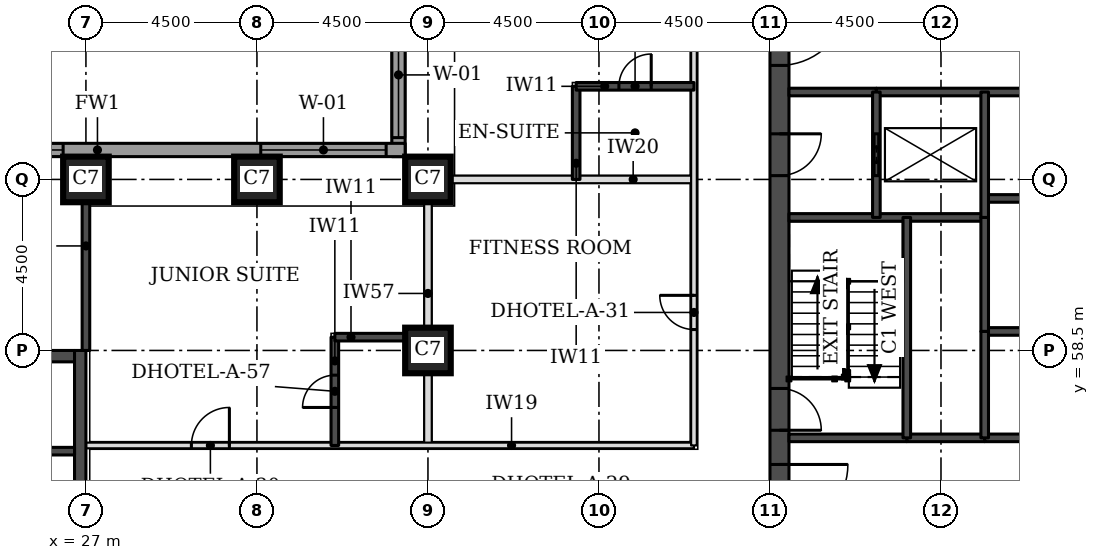
"""IFC4 building model, lengths in metres.
Left out: names, types, materials, properties, quantities, classifications, styles, units other than length and angle.
Written with IfcOpenShell. Run it as: python <this file> out.ifc"""

import sys

from ifc_helpers import new_model, si_unit, direction, frame, frame_2d, origin, origin_2d, place, context, subcontext, project, spatial, rectangle, extrude, element, fill, save


model = new_model("IFC4")
c1 = context("Model", 3, precision=1e-05, world=origin(), true_north=direction((0.0, 1.0)))
c2 = subcontext(c1, "Body", "Model", "MODEL_VIEW")
j1 = project(units=[si_unit("LENGTHUNIT", "METRE"), si_unit("PLANEANGLEUNIT", "RADIAN")], contexts=[c1])
p1 = place(None, origin())
s1 = spatial("IfcSite", under=j1, at=p1, CompositionType="ELEMENT")
p2 = place(p1, origin())
s2 = spatial("IfcBuilding", under=s1, at=p2, CompositionType="ELEMENT")
p3 = place(p2, frame((0.0, 0.0, 49.5)))
s3 = spatial("IfcBuildingStorey", under=s2, at=p3, CompositionType="ELEMENT", Elevation=49.5)
for number, where, z_axis, x_axis in (
    (1, (36.0, 58.5, 0.0), (0.0, 0.0, 1.0), (1.0, 0.0, 0.0)),
    (2, (27.0, 63.0, 0.0), (0.0, 0.0, 1.0), (1.0, 0.0, 0.0)),
    (3, (31.5, 63.0, 0.0), (0.0, 0.0, 1.0), (1.0, 0.0, 0.0)),
    (4, (36.0, 63.0, 0.0), (0.0, 0.0, 1.0), (1.0, 0.0, 0.0)),
):
    element("IfcColumn", number, at=place(p3, frame(where, z_axis=z_axis, x_axis=x_axis)), inside=s3, PredefinedType="COLUMN", context=c2, shape_type="SweptSolid", body=[
        extrude(rectangle(XDim=1.2, YDim=1.2, at=origin_2d()), origin(), (0.0, 0.0, 1.0), 3.3),
    ])
p4 = place(p3, frame((45.25, 49.5, 0.0), z_axis=(0.0, 0.0, 1.0), x_axis=(0.0, 1.0, 0.0)))
e5 = element("IfcWall", 5, at=p4, inside=s3, PredefinedType="SHEAR", context=c2, shape_type="SweptSolid", body=[
    extrude(rectangle(XDim=22.5, YDim=0.5, at=frame_2d((11.25, 0.0))), origin(), (0.0, 0.0, 1.0), 3.3),
])
p5 = place(p4, frame((4.2, 0.0, 0.0)))
e6 = element("IfcOpeningElement", 6, at=p5, cuts=e5, PredefinedType="OPENING", context=c2, shape_type="SweptSolid", body=[
    extrude(rectangle(XDim=1.8, YDim=2.1, at=frame_2d((0.9, 1.05))), frame((0.0, 0.26, 0.0), z_axis=(0.0, -1.0, 0.0), x_axis=(1.0, 0.0, 0.0)), (0.0, 0.0, 1.0), 0.52),
])
p6 = place(p4, frame((6.9, 0.0, 0.0)))
e7 = element("IfcOpeningElement", 7, at=p6, cuts=e5, PredefinedType="OPENING", context=c2, shape_type="SweptSolid", body=[
    extrude(rectangle(XDim=1.1, YDim=2.1, at=frame_2d((0.55, 1.05))), frame((0.0, 0.26, 0.0), z_axis=(0.0, -1.0, 0.0), x_axis=(1.0, 0.0, 0.0)), (0.0, 0.0, 1.0), 0.52),
])
p7 = place(p4, frame((13.6, 0.0, 0.0)))
e8 = element("IfcOpeningElement", 8, at=p7, cuts=e5, PredefinedType="OPENING", context=c2, shape_type="SweptSolid", body=[
    extrude(rectangle(XDim=1.1, YDim=2.1, at=frame_2d((0.55, 1.05))), frame((0.0, 0.26, 0.0), z_axis=(0.0, -1.0, 0.0), x_axis=(1.0, 0.0, 0.0)), (0.0, 0.0, 1.0), 0.52),
])
p8 = place(p4, frame((16.5, 0.0, 0.0)))
e9 = element("IfcOpeningElement", 9, at=p8, cuts=e5, PredefinedType="OPENING", context=c2, shape_type="SweptSolid", body=[
    extrude(rectangle(XDim=1.8, YDim=2.1, at=frame_2d((0.9, 1.05))), frame((0.0, 0.26, 0.0), z_axis=(0.0, -1.0, 0.0), x_axis=(1.0, 0.0, 0.0)), (0.0, 0.0, 1.0), 0.52),
])
p9 = place(p3, frame((18.3, 58.35, 0.0), z_axis=(0.0, 0.0, 1.0), x_axis=(1.0, 0.0, 0.0)))
e10 = element("IfcWall", 10, at=p9, inside=s3, PredefinedType="SHEAR", context=c2, shape_type="SweptSolid", body=[
    extrude(rectangle(XDim=8.4, YDim=0.3, at=frame_2d((4.2, 0.0))), origin(), (0.0, 0.0, 1.0), 3.3),
])
p10 = place(p9, frame((3.3, 0.0, 0.0)))
e11 = element("IfcOpeningElement", 11, at=p10, cuts=e10, PredefinedType="OPENING", context=c2, shape_type="SweptSolid", body=[
    extrude(rectangle(XDim=1.8, YDim=2.1, at=frame_2d((0.9, 1.05))), frame((0.0, 0.16, 0.0), z_axis=(0.0, -1.0, 0.0), x_axis=(1.0, 0.0, 0.0)), (0.0, 0.0, 1.0), 0.32),
])
p11 = place(p3, frame((26.85, 49.5, 0.0), z_axis=(0.0, 0.0, 1.0), x_axis=(0.0, 1.0, 0.0)))
e12 = element("IfcWall", 12, at=p11, inside=s3, PredefinedType="SHEAR", context=c2, shape_type="SweptSolid", body=[
    extrude(rectangle(XDim=9.0, YDim=0.3, at=frame_2d((4.5, 0.0))), origin(), (0.0, 0.0, 1.0), 3.3),
])
p12 = place(p3, frame((35.225, 76.894, 0.0), z_axis=(0.0, 0.0, 1.0), x_axis=(0.0, -1.0, 0.0)))
e13 = element("IfcWall", 13, at=p12, inside=s3, PredefinedType="STANDARD", context=c2, shape_type="SweptSolid", body=[
    extrude(rectangle(XDim=13.293, YDim=0.35, at=frame_2d((6.647, 0.0))), origin(), (0.0, 0.0, 1.0), 3.055),
])
p13 = place(p12, frame((9.493, 0.0, 0.8)))
e14 = element("IfcOpeningElement", 14, at=p13, cuts=e13, PredefinedType="OPENING", context=c2, shape_type="SweptSolid", body=[
    extrude(rectangle(XDim=3.3, YDim=1.5, at=frame_2d((1.65, 0.75))), frame((0.0, 0.185, 0.0), z_axis=(0.0, -1.0, 0.0), x_axis=(1.0, 0.0, 0.0)), (0.0, 0.0, 1.0), 0.37),
])
p14 = place(p3, frame((35.4, 63.775, 0.0), z_axis=(0.0, 0.0, 1.0), x_axis=(-1.0, 0.0, 0.0)))
e15 = element("IfcWall", 15, at=p14, inside=s3, PredefinedType="STANDARD", context=c2, shape_type="SweptSolid", body=[
    extrude(rectangle(XDim=17.793, YDim=0.35, at=frame_2d((8.897, 0.0))), origin(), (0.0, 0.0, 1.0), 3.055),
])
p15 = place(p14, frame((0.5, 0.0, 0.8)))
e16 = element("IfcOpeningElement", 16, at=p15, cuts=e15, PredefinedType="OPENING", context=c2, shape_type="SweptSolid", body=[
    extrude(rectangle(XDim=3.3, YDim=1.5, at=frame_2d((1.65, 0.75))), frame((0.0, 0.185, 0.0), z_axis=(0.0, -1.0, 0.0), x_axis=(1.0, 0.0, 0.0)), (0.0, 0.0, 1.0), 0.37),
])
p16 = place(p14, frame((9.0, 0.0, 0.8)))
e17 = element("IfcOpeningElement", 17, at=p16, cuts=e15, PredefinedType="OPENING", context=c2, shape_type="SweptSolid", body=[
    extrude(rectangle(XDim=3.3, YDim=1.5, at=frame_2d((1.65, 0.75))), frame((0.0, 0.185, 0.0), z_axis=(0.0, -1.0, 0.0), x_axis=(1.0, 0.0, 0.0)), (0.0, 0.0, 1.0), 0.37),
])
p17 = place(p3, frame((36.0, 56.0, 0.0), z_axis=(0.0, 0.0, 1.0), x_axis=(0.0, 1.0, 0.0)))
e18 = element("IfcWall", 18, at=p17, inside=s3, PredefinedType="PARTITIONING", context=c2, shape_type="SweptSolid", body=[
    extrude(rectangle(XDim=6.4, YDim=0.2, at=frame_2d((3.2, 0.0))), origin(), (0.0, 0.0, 1.0), 2.33),
])
p18 = place(p3, frame((36.6, 63.0, 0.0), z_axis=(0.0, 0.0, 1.0), x_axis=(1.0, 0.0, 0.0)))
e19 = element("IfcWall", 19, at=p18, inside=s3, PredefinedType="PARTITIONING", context=c2, shape_type="SweptSolid", body=[
    extrude(rectangle(XDim=6.4, YDim=0.2, at=frame_2d((3.2, 0.0))), origin(), (0.0, 0.0, 1.0), 3.08),
])
p19 = place(p3, frame((27.0, 56.0, 0.0), z_axis=(0.0, 0.0, 1.0), x_axis=(1.0, 0.0, 0.0)))
e20 = element("IfcWall", 20, at=p19, inside=s3, PredefinedType="PARTITIONING", context=c2, shape_type="SweptSolid", body=[
    extrude(rectangle(XDim=16.0, YDim=0.15, at=frame_2d((8.0, 0.0))), origin(), (0.0, 0.0, 1.0), 3.08),
])
p20 = place(p19, frame((2.775, 0.0, 0.0)))
e21 = element("IfcOpeningElement", 21, at=p20, cuts=e20, PredefinedType="OPENING", context=c2, shape_type="SweptSolid", body=[
    extrude(rectangle(XDim=1.0, YDim=2.1, at=frame_2d((0.5, 1.05))), frame((0.0, 0.085, 0.0), z_axis=(0.0, -1.0, 0.0), x_axis=(1.0, 0.0, 0.0)), (0.0, 0.0, 1.0), 0.17),
])
p21 = place(p3, frame((43.0, 56.0, 0.0), z_axis=(0.0, 0.0, 1.0), x_axis=(0.0, 1.0, 0.0)))
e22 = element("IfcWall", 22, at=p21, inside=s3, PredefinedType="PARTITIONING", context=c2, shape_type="SweptSolid", body=[
    extrude(rectangle(XDim=18.0, YDim=0.15, at=frame_2d((9.0, 0.0))), origin(), (0.0, 0.0, 1.0), 3.08),
])
p22 = place(p21, frame((12.225, 0.0, 0.0)))
e23 = element("IfcOpeningElement", 23, at=p22, cuts=e22, PredefinedType="OPENING", context=c2, shape_type="SweptSolid", body=[
    extrude(rectangle(XDim=1.0, YDim=2.1, at=frame_2d((0.5, 1.05))), frame((0.0, 0.085, 0.0), z_axis=(0.0, -1.0, 0.0), x_axis=(1.0, 0.0, 0.0)), (0.0, 0.0, 1.0), 0.17),
])
p23 = place(p21, frame((16.553, 0.0, 0.0)))
e24 = element("IfcOpeningElement", 24, at=p23, cuts=e22, PredefinedType="OPENING", context=c2, shape_type="SweptSolid", body=[
    extrude(rectangle(XDim=1.0, YDim=2.1, at=frame_2d((0.5, 1.05))), frame((0.0, 0.085, 0.0), z_axis=(0.0, -1.0, 0.0), x_axis=(1.0, 0.0, 0.0)), (0.0, 0.0, 1.0), 0.17),
])
p24 = place(p21, frame((3.05, 0.0, 0.0)))
e25 = element("IfcOpeningElement", 25, at=p24, cuts=e22, PredefinedType="OPENING", context=c2, shape_type="SweptSolid", body=[
    extrude(rectangle(XDim=0.9, YDim=2.1, at=frame_2d((0.45, 1.05))), frame((0.0, 0.085, 0.0), z_axis=(0.0, -1.0, 0.0), x_axis=(1.0, 0.0, 0.0)), (0.0, 0.0, 1.0), 0.17),
])
p25 = place(p3, frame((27.0, 58.5, 0.0), z_axis=(0.0, 0.0, 1.0), x_axis=(0.0, 1.0, 0.0)))
e26 = element("IfcWall", 26, at=p25, inside=s3, PredefinedType="SOLIDWALL", context=c2, shape_type="SweptSolid", body=[
    extrude(rectangle(XDim=3.9, YDim=0.2, at=frame_2d((1.95, 0.0))), origin(), (0.0, 0.0, 1.0), 3.08),
])
p26 = place(p3, frame((33.55, 56.0, 0.0), z_axis=(0.0, 0.0, 1.0), x_axis=(0.0, 1.0, 0.0)))
e27 = element("IfcWall", 27, at=p26, inside=s3, PredefinedType="SOLIDWALL", context=c2, shape_type="SweptSolid", body=[
    extrude(rectangle(XDim=2.85, YDim=0.2, at=frame_2d((1.425, 0.0))), origin(), (0.0, 0.0, 1.0), 3.08),
])
p27 = place(p26, frame((1.0, 0.0, 0.0)))
e28 = element("IfcOpeningElement", 28, at=p27, cuts=e27, PredefinedType="OPENING", context=c2, shape_type="SweptSolid", body=[
    extrude(rectangle(XDim=0.85, YDim=2.1, at=frame_2d((0.425, 1.05))), frame((0.0, 0.11, 0.0), z_axis=(0.0, -1.0, 0.0), x_axis=(1.0, 0.0, 0.0)), (0.0, 0.0, 1.0), 0.22),
])
for number, where, z_axis, x_axis in (
    (29, (33.55, 58.85, 0.0), (0.0, 0.0, 1.0), (1.0, 0.0, 0.0)),
    (30, (39.9, 63.0, 0.0), (0.0, 0.0, 1.0), (0.0, 1.0, 0.0)),
):
    element("IfcWall", number, at=place(p3, frame(where, z_axis=z_axis, x_axis=x_axis)), inside=s3, PredefinedType="SOLIDWALL", context=c2, shape_type="SweptSolid", body=[
        extrude(rectangle(XDim=2.45, YDim=0.2, at=frame_2d((1.225, 0.0))), origin(), (0.0, 0.0, 1.0), 3.08),
    ])
p28 = place(p3, frame((39.9, 65.45, 0.0), z_axis=(0.0, 0.0, 1.0), x_axis=(1.0, 0.0, 0.0)))
e31 = element("IfcWall", 31, at=p28, inside=s3, PredefinedType="SOLIDWALL", context=c2, shape_type="SweptSolid", body=[
    extrude(rectangle(XDim=3.1, YDim=0.2, at=frame_2d((1.55, 0.0))), origin(), (0.0, 0.0, 1.0), 3.08),
])
p29 = place(p28, frame((1.125, 0.0, 0.0)))
e32 = element("IfcOpeningElement", 32, at=p29, cuts=e31, PredefinedType="OPENING", context=c2, shape_type="SweptSolid", body=[
    extrude(rectangle(XDim=0.85, YDim=2.1, at=frame_2d((0.425, 1.05))), frame((0.0, 0.11, 0.0), z_axis=(0.0, -1.0, 0.0), x_axis=(1.0, 0.0, 0.0)), (0.0, 0.0, 1.0), 0.22),
])
p30 = place(p3, frame((48.6, 56.2, 0.0), z_axis=(0.0, 0.0, 1.0), x_axis=(1.0, 0.0, 0.0)))
e33 = element("IfcWall", 33, at=p30, inside=s3, PredefinedType="SOLIDWALL", context=c2, shape_type="SweptSolid", body=[
    extrude(rectangle(XDim=2.05, YDim=0.2, at=frame_2d((1.025, 0.0))), origin(), (0.0, 0.0, 1.0), 3.08),
])
p31 = place(p3, frame((45.5, 56.2, 0.0), z_axis=(0.0, 0.0, 1.0), x_axis=(1.0, 0.0, 0.0)))
e34 = element("IfcWall", 34, at=p31, inside=s3, PredefinedType="SOLIDWALL", context=c2, shape_type="SweptSolid", body=[
    extrude(rectangle(XDim=3.1, YDim=0.2, at=frame_2d((1.55, 0.0))), origin(), (0.0, 0.0, 1.0), 3.08),
])
p32 = place(p3, frame((50.65, 56.2, 0.0), z_axis=(0.0, 0.0, 1.0), x_axis=(1.0, 0.0, 0.0)))
e35 = element("IfcWall", 35, at=p32, inside=s3, PredefinedType="SOLIDWALL", context=c2, shape_type="SweptSolid", body=[
    extrude(rectangle(XDim=11.2, YDim=0.2, at=frame_2d((5.6, 0.0))), origin(), (0.0, 0.0, 1.0), 3.08),
])
p33 = place(p3, frame((50.65, 59.0, 0.0), z_axis=(0.0, 0.0, 1.0), x_axis=(1.0, 0.0, 0.0)))
e36 = element("IfcWall", 36, at=p33, inside=s3, PredefinedType="SOLIDWALL", context=c2, shape_type="SweptSolid", body=[
    extrude(rectangle(XDim=11.2, YDim=0.2, at=frame_2d((5.6, 0.0))), origin(), (0.0, 0.0, 1.0), 3.3),
])
p34 = place(p3, frame((45.5, 62.0, 0.0), z_axis=(0.0, 0.0, 1.0), x_axis=(1.0, 0.0, 0.0)))
e37 = element("IfcWall", 37, at=p34, inside=s3, PredefinedType="SOLIDWALL", context=c2, shape_type="SweptSolid", body=[
    extrude(rectangle(XDim=5.15, YDim=0.2, at=frame_2d((2.575, 0.0))), origin(), (0.0, 0.0, 1.0), 3.08),
])
p35 = place(p3, frame((50.65, 62.5, 0.0), z_axis=(0.0, 0.0, 1.0), x_axis=(1.0, 0.0, 0.0)))
e38 = element("IfcWall", 38, at=p35, inside=s3, PredefinedType="SOLIDWALL", context=c2, shape_type="SweptSolid", body=[
    extrude(rectangle(XDim=11.2, YDim=0.2, at=frame_2d((5.6, 0.0))), origin(), (0.0, 0.0, 1.0), 3.3),
])
p36 = place(p3, frame((45.5, 65.3, 0.0), z_axis=(0.0, 0.0, 1.0), x_axis=(1.0, 0.0, 0.0)))
e39 = element("IfcWall", 39, at=p36, inside=s3, PredefinedType="SOLIDWALL", context=c2, shape_type="SweptSolid", body=[
    extrude(rectangle(XDim=2.3, YDim=0.2, at=frame_2d((1.15, 0.0))), origin(), (0.0, 0.0, 1.0), 3.08),
])
p37 = place(p3, frame((47.8, 65.3, 0.0), z_axis=(0.0, 0.0, 1.0), x_axis=(1.0, 0.0, 0.0)))
e40 = element("IfcWall", 40, at=p37, inside=s3, PredefinedType="SOLIDWALL", context=c2, shape_type="SweptSolid", body=[
    extrude(rectangle(XDim=16.9, YDim=0.2, at=frame_2d((8.45, 0.0))), origin(), (0.0, 0.0, 1.0), 3.08),
])
p38 = place(p3, frame((47.8, 62.0, 0.0), z_axis=(0.0, 0.0, 1.0), x_axis=(0.0, 1.0, 0.0)))
e41 = element("IfcWall", 41, at=p38, inside=s3, PredefinedType="SOLIDWALL", context=c2, shape_type="SweptSolid", body=[
    extrude(rectangle(XDim=3.3, YDim=0.2, at=frame_2d((1.65, 0.0))), origin(), (0.0, 0.0, 1.0), 3.08),
])
p39 = place(p38, frame((1.1, 0.0, 0.0)))
e42 = element("IfcOpeningElement", 42, at=p39, cuts=e41, PredefinedType="OPENING", context=c2, shape_type="SweptSolid", body=[
    extrude(rectangle(XDim=1.1, YDim=2.1, at=frame_2d((0.55, 1.05))), frame((0.0, 0.11, 0.0), z_axis=(0.0, -1.0, 0.0), x_axis=(1.0, 0.0, 0.0)), (0.0, 0.0, 1.0), 0.22),
])
p40 = place(p3, frame((48.6, 56.2, 0.0), z_axis=(0.0, 0.0, 1.0), x_axis=(0.0, 1.0, 0.0)))
e43 = element("IfcWall", 43, at=p40, inside=s3, PredefinedType="SOLIDWALL", context=c2, shape_type="SweptSolid", body=[
    extrude(rectangle(XDim=5.8, YDim=0.2, at=frame_2d((2.9, 0.0))), origin(), (0.0, 0.0, 1.0), 3.08),
])
p41 = place(p3, frame((50.65, 59.0, 0.0), z_axis=(0.0, 0.0, 1.0), x_axis=(0.0, 1.0, 0.0)))
e44 = element("IfcWall", 44, at=p41, inside=s3, PredefinedType="SOLIDWALL", context=c2, shape_type="SweptSolid", body=[
    extrude(rectangle(XDim=3.0, YDim=0.2, at=frame_2d((1.5, 0.0))), origin(), (0.0, 0.0, 1.0), 3.3),
])
p42 = place(p3, frame((50.65, 56.2, 0.0), z_axis=(0.0, 0.0, 1.0), x_axis=(0.0, 1.0, 0.0)))
e45 = element("IfcWall", 45, at=p42, inside=s3, PredefinedType="SOLIDWALL", context=c2, shape_type="SweptSolid", body=[
    extrude(rectangle(XDim=2.8, YDim=0.2, at=frame_2d((1.4, 0.0))), origin(), (0.0, 0.0, 1.0), 3.08),
])
p43 = place(p3, frame((50.65, 62.0, 0.0), z_axis=(0.0, 0.0, 1.0), x_axis=(0.0, 1.0, 0.0)))
e46 = element("IfcWall", 46, at=p43, inside=s3, PredefinedType="SOLIDWALL", context=c2, shape_type="SweptSolid", body=[
    extrude(rectangle(XDim=3.3, YDim=0.2, at=frame_2d((1.65, 0.0))), origin(), (0.0, 0.0, 1.0), 3.08),
])
p44 = place(p3, frame((23.2, 55.85, 0.0), z_axis=(0.0, 0.0, 1.0), x_axis=(1.0, 0.0, 0.0)))
e47 = element("IfcWall", 47, at=p44, inside=s3, PredefinedType="SOLIDWALL", context=c2, shape_type="SweptSolid", body=[
    extrude(rectangle(XDim=3.5, YDim=0.2, at=frame_2d((1.75, 0.0))), origin(), (0.0, 0.0, 1.0), 3.08),
])
p45 = place(p44, frame((1.2, 0.0, 0.0)))
e48 = element("IfcOpeningElement", 48, at=p45, cuts=e47, PredefinedType="OPENING", context=c2, shape_type="SweptSolid", body=[
    extrude(rectangle(XDim=1.1, YDim=2.1, at=frame_2d((0.55, 1.05))), frame((0.0, 0.11, 0.0), z_axis=(0.0, -1.0, 0.0), x_axis=(1.0, 0.0, 0.0)), (0.0, 0.0, 1.0), 0.22),
])
p46 = place(p13, origin())
e49 = element("IfcWindow", 49, at=p46, inside=s3, PartitioningType="SINGLE_PANEL", PredefinedType="WINDOW", context=c2, shape_type="SweptSolid", body=[
    extrude(rectangle(XDim=3.3, YDim=1.5, at=frame_2d((1.65, 0.75))), frame((0.0, 0.085, 0.0), z_axis=(0.0, -1.0, 0.0), x_axis=(1.0, 0.0, 0.0)), (0.0, 0.0, 1.0), 0.06),
])
fill(e14, e49)
p47 = place(p15, origin())
e50 = element("IfcWindow", 50, at=p47, inside=s3, PartitioningType="SINGLE_PANEL", PredefinedType="WINDOW", context=c2, shape_type="SweptSolid", body=[
    extrude(rectangle(XDim=3.3, YDim=1.5, at=frame_2d((1.65, 0.75))), frame((0.0, 0.085, 0.0), z_axis=(0.0, -1.0, 0.0), x_axis=(1.0, 0.0, 0.0)), (0.0, 0.0, 1.0), 0.06),
])
fill(e16, e50)
p48 = place(p16, origin())
e51 = element("IfcWindow", 51, at=p48, inside=s3, PartitioningType="SINGLE_PANEL", PredefinedType="WINDOW", context=c2, shape_type="SweptSolid", body=[
    extrude(rectangle(XDim=3.3, YDim=1.5, at=frame_2d((1.65, 0.75))), frame((0.0, 0.085, 0.0), z_axis=(0.0, -1.0, 0.0), x_axis=(1.0, 0.0, 0.0)), (0.0, 0.0, 1.0), 0.06),
])
fill(e17, e51)
p49 = place(p20, origin())
e52 = element("IfcDoor", 52, at=p49, inside=s3, OperationType="SINGLE_SWING_RIGHT", PredefinedType="DOOR", context=c2, shape_type="SweptSolid", body=[
    extrude(rectangle(XDim=1.0, YDim=2.1, at=frame_2d((0.5, 1.05))), frame((0.0, 0.025, 0.0), z_axis=(0.0, -1.0, 0.0), x_axis=(1.0, 0.0, 0.0)), (0.0, 0.0, 1.0), 0.05),
])
fill(e21, e52)
p50 = place(p27, origin())
e53 = element("IfcDoor", 53, at=p50, inside=s3, OperationType="SINGLE_SWING_LEFT", PredefinedType="DOOR", context=c2, shape_type="SweptSolid", body=[
    extrude(rectangle(XDim=0.85, YDim=2.1, at=frame_2d((0.425, 1.05))), frame((0.0, 0.025, 0.0), z_axis=(0.0, -1.0, 0.0), x_axis=(1.0, 0.0, 0.0)), (0.0, 0.0, 1.0), 0.05),
])
fill(e28, e53)
p51 = place(p29, origin())
e54 = element("IfcDoor", 54, at=p51, inside=s3, OperationType="SINGLE_SWING_RIGHT", PredefinedType="DOOR", context=c2, shape_type="SweptSolid", body=[
    extrude(rectangle(XDim=0.85, YDim=2.1, at=frame_2d((0.425, 1.05))), frame((0.0, 0.025, 0.0), z_axis=(0.0, -1.0, 0.0), x_axis=(1.0, 0.0, 0.0)), (0.0, 0.0, 1.0), 0.05),
])
fill(e32, e54)
p52 = place(p24, origin())
e55 = element("IfcDoor", 55, at=p52, inside=s3, OperationType="SINGLE_SWING_RIGHT", PredefinedType="DOOR", context=c2, shape_type="SweptSolid", body=[
    extrude(rectangle(XDim=0.9, YDim=2.1, at=frame_2d((0.45, 1.05))), frame((0.0, 0.025, 0.0), z_axis=(0.0, -1.0, 0.0), x_axis=(1.0, 0.0, 0.0)), (0.0, 0.0, 1.0), 0.05),
])
fill(e25, e55)
p53 = place(p39, origin())
e56 = element("IfcDoor", 56, at=p53, inside=s3, OperationType="DOUBLE_DOOR_SLIDING", PredefinedType="DOOR", context=c2, shape_type="SweptSolid", body=[
    extrude(rectangle(XDim=1.1, YDim=2.1, at=frame_2d((0.55, 1.05))), frame((0.0, 0.025, 0.0), z_axis=(0.0, -1.0, 0.0), x_axis=(1.0, 0.0, 0.0)), (0.0, 0.0, 1.0), 0.05),
])
fill(e42, e56)
p54 = place(p5, frame((1.8, 0.0, 0.0), z_axis=(0.0, 0.0, 1.0), x_axis=(-1.0, 0.0, 0.0)))
e57 = element("IfcDoor", 57, at=p54, inside=s3, OperationType="SINGLE_SWING_LEFT", PredefinedType="DOOR", context=c2, shape_type="SweptSolid", body=[
    extrude(rectangle(XDim=1.8, YDim=2.1, at=frame_2d((0.9, 1.05))), frame((0.0, 0.025, 0.0), z_axis=(0.0, -1.0, 0.0), x_axis=(1.0, 0.0, 0.0)), (0.0, 0.0, 1.0), 0.05),
])
fill(e6, e57)
p55 = place(p6, frame((1.1, 0.0, 0.0), z_axis=(0.0, 0.0, 1.0), x_axis=(-1.0, 0.0, 0.0)))
e58 = element("IfcDoor", 58, at=p55, inside=s3, OperationType="SINGLE_SWING_RIGHT", PredefinedType="DOOR", context=c2, shape_type="SweptSolid", body=[
    extrude(rectangle(XDim=1.1, YDim=2.1, at=frame_2d((0.55, 1.05))), frame((0.0, 0.025, 0.0), z_axis=(0.0, -1.0, 0.0), x_axis=(1.0, 0.0, 0.0)), (0.0, 0.0, 1.0), 0.05),
])
fill(e7, e58)
p56 = place(p7, frame((1.1, 0.0, 0.0), z_axis=(0.0, 0.0, 1.0), x_axis=(-1.0, 0.0, 0.0)))
e59 = element("IfcDoor", 59, at=p56, inside=s3, OperationType="SINGLE_SWING_LEFT", PredefinedType="DOOR", context=c2, shape_type="SweptSolid", body=[
    extrude(rectangle(XDim=1.1, YDim=2.1, at=frame_2d((0.55, 1.05))), frame((0.0, 0.025, 0.0), z_axis=(0.0, -1.0, 0.0), x_axis=(1.0, 0.0, 0.0)), (0.0, 0.0, 1.0), 0.05),
])
fill(e8, e59)
p57 = place(p8, frame((1.8, 0.0, 0.0), z_axis=(0.0, 0.0, 1.0), x_axis=(-1.0, 0.0, 0.0)))
e60 = element("IfcDoor", 60, at=p57, inside=s3, OperationType="SINGLE_SWING_LEFT", PredefinedType="DOOR", context=c2, shape_type="SweptSolid", body=[
    extrude(rectangle(XDim=1.8, YDim=2.1, at=frame_2d((0.9, 1.05))), frame((0.0, 0.025, 0.0), z_axis=(0.0, -1.0, 0.0), x_axis=(1.0, 0.0, 0.0)), (0.0, 0.0, 1.0), 0.05),
])
fill(e9, e60)
save(model, sys.argv[1])
